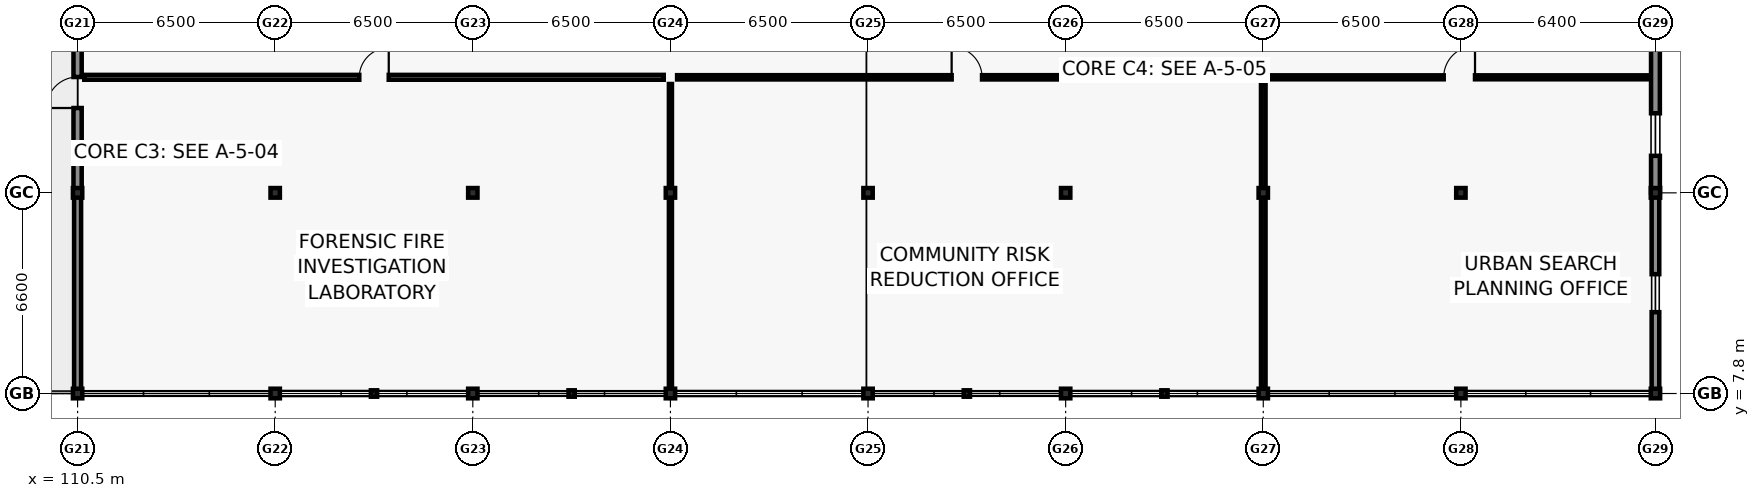
"""IFC4 building model, lengths in metres.
Left out: names, types, materials, properties, quantities, classifications, styles, units other than length and angle.
Written with IfcOpenShell. Run it as: python <this file> out.ifc"""

import sys

from ifc_helpers import new_model, si_unit, direction, frame, frame_2d, origin, origin_2d, place, context, subcontext, project, spatial, rectangle, i_section, extrude, element, fill, save


model = new_model("IFC4")
c1 = context("Model", 3, precision=1e-05, world=origin(), true_north=direction((0.0, 1.0)))
c2 = subcontext(c1, "Body", "Model", "MODEL_VIEW")
j1 = project(units=[si_unit("LENGTHUNIT", "METRE"), si_unit("PLANEANGLEUNIT", "RADIAN")], contexts=[c1])
p1 = place(None, origin())
s1 = spatial("IfcSite", under=j1, at=p1, CompositionType="ELEMENT")
p2 = place(p1, origin())
s2 = spatial("IfcBuilding", under=s1, at=p2, CompositionType="ELEMENT")
p3 = place(p2, frame((0.0, 0.0, 13.5)))
s3 = spatial("IfcBuildingStorey", under=s2, at=p3, CompositionType="ELEMENT", Elevation=13.5)
for number, where, z_axis, x_axis in (
    (1, (110.5, 7.8, 0.0), (0.0, 0.0, 1.0), (1.0, 0.0, 0.0)),
    (2, (110.5, 14.4, 0.0), (0.0, 0.0, 1.0), (1.0, 0.0, 0.0)),
    (3, (117.0, 7.8, 0.0), (0.0, 0.0, 1.0), (1.0, 0.0, 0.0)),
    (4, (117.0, 14.4, 0.0), (0.0, 0.0, 1.0), (1.0, 0.0, 0.0)),
    (5, (123.5, 7.8, 0.0), (0.0, 0.0, 1.0), (1.0, 0.0, 0.0)),
    (6, (123.5, 14.4, 0.0), (0.0, 0.0, 1.0), (1.0, 0.0, 0.0)),
    (7, (130.0, 7.8, 0.0), (0.0, 0.0, 1.0), (1.0, 0.0, 0.0)),
    (8, (130.0, 14.4, 0.0), (0.0, 0.0, 1.0), (1.0, 0.0, 0.0)),
    (9, (136.5, 7.8, 0.0), (0.0, 0.0, 1.0), (1.0, 0.0, 0.0)),
    (10, (136.5, 14.4, 0.0), (0.0, 0.0, 1.0), (1.0, 0.0, 0.0)),
    (11, (143.0, 7.8, 0.0), (0.0, 0.0, 1.0), (1.0, 0.0, 0.0)),
    (12, (143.0, 14.4, 0.0), (0.0, 0.0, 1.0), (1.0, 0.0, 0.0)),
    (13, (149.5, 7.8, 0.0), (0.0, 0.0, 1.0), (1.0, 0.0, 0.0)),
    (14, (149.5, 14.4, 0.0), (0.0, 0.0, 1.0), (1.0, 0.0, 0.0)),
    (15, (156.0, 7.8, 0.0), (0.0, 0.0, 1.0), (1.0, 0.0, 0.0)),
    (16, (156.0, 14.4, 0.0), (0.0, 0.0, 1.0), (1.0, 0.0, 0.0)),
    (17, (162.4, 7.8, 0.0), (0.0, 0.0, 1.0), (1.0, 0.0, 0.0)),
    (18, (162.4, 14.4, 0.0), (0.0, 0.0, 1.0), (1.0, 0.0, 0.0)),
):
    element("IfcColumn", number, at=place(p3, frame(where, z_axis=z_axis, x_axis=x_axis)), inside=s3, PredefinedType="COLUMN", context=c2, shape_type="SweptSolid", body=[
        extrude(i_section(OverallWidth=0.307, OverallDepth=0.315, WebThickness=0.012, FlangeThickness=0.019, FilletRadius=0.017, at=origin_2d()), origin(), (0.0, 0.0, 1.0), 3.9),
    ])
for number, where, z_axis, x_axis in (
    (19, (120.25, 7.8, 0.0), (0.0, 0.0, 1.0), (1.0, 0.0, 0.0)),
    (20, (126.75, 7.8, 0.0), (0.0, 0.0, 1.0), (1.0, 0.0, 0.0)),
    (21, (139.75, 7.8, 0.0), (0.0, 0.0, 1.0), (1.0, 0.0, 0.0)),
    (22, (146.25, 7.8, 0.0), (0.0, 0.0, 1.0), (1.0, 0.0, 0.0)),
):
    element("IfcColumn", number, at=place(p3, frame(where, z_axis=z_axis, x_axis=x_axis)), inside=s3, PredefinedType="PILASTER", context=c2, shape_type="SweptSolid", body=[
        extrude(i_section(OverallWidth=0.205, OverallDepth=0.21, WebThickness=0.009, FlangeThickness=0.014, FilletRadius=0.011, at=origin_2d()), origin(), (0.0, 0.0, 1.0), 3.9),
    ])
p4 = place(p3, frame((110.5, 7.805, 0.0), z_axis=(0.0, 0.0, 1.0), x_axis=(0.0, 1.0, 0.0)))
e23 = element("IfcWall", 23, at=p4, inside=s3, PredefinedType="SOLIDWALL", context=c2, shape_type="SweptSolid", body=[
    extrude(rectangle(XDim=6.59, YDim=0.23, at=frame_2d((3.295, 0.0))), origin(), (0.0, 0.0, 1.0), 3.02),
])
p5 = place(p3, frame((162.4, 14.395, 0.0), z_axis=(0.0, 0.0, 1.0), x_axis=(0.0, -1.0, 0.0)))
e24 = element("IfcWall", 24, at=p5, inside=s3, PredefinedType="SOLIDWALL", context=c2, shape_type="SweptSolid", body=[
    extrude(rectangle(XDim=6.59, YDim=0.25, at=frame_2d((3.295, 0.0))), origin(), (0.0, 0.0, 1.0), 3.02),
])
p6 = place(p5, frame((2.67, 0.0, 0.8)))
e25 = element("IfcOpeningElement", 25, at=p6, cuts=e24, PredefinedType="OPENING", context=c2, shape_type="SweptSolid", body=[
    extrude(rectangle(XDim=1.25, YDim=1.65, at=frame_2d((0.625, 0.825))), frame((0.0, 0.135, 0.0), z_axis=(0.0, -1.0, 0.0), x_axis=(1.0, 0.0, 0.0)), (0.0, 0.0, 1.0), 0.27),
])
p7 = place(p3, frame((110.5, 14.405, 0.0), z_axis=(0.0, 0.0, 1.0), x_axis=(0.0, 1.0, 0.0)))
e26 = element("IfcWall", 26, at=p7, inside=s3, PredefinedType="SOLIDWALL", context=c2, shape_type="SweptSolid", body=[
    extrude(rectangle(XDim=6.59, YDim=0.27, at=frame_2d((3.295, 0.0))), origin(), (0.0, 0.0, 1.0), 3.02),
])
p8 = place(p7, frame((2.785, 0.0, 0.0)))
e27 = element("IfcOpeningElement", 27, at=p8, cuts=e26, PredefinedType="OPENING", context=c2, shape_type="SweptSolid", body=[
    extrude(rectangle(XDim=1.02, YDim=2.14, at=frame_2d((0.51, 1.07))), frame((0.0, 0.145, 0.0), z_axis=(0.0, -1.0, 0.0), x_axis=(1.0, 0.0, 0.0)), (0.0, 0.0, 1.0), 0.29),
])
p9 = place(p3, frame((162.4, 20.995, 0.0), z_axis=(0.0, 0.0, 1.0), x_axis=(0.0, -1.0, 0.0)))
e28 = element("IfcWall", 28, at=p9, inside=s3, PredefinedType="SOLIDWALL", context=c2, shape_type="SweptSolid", body=[
    extrude(rectangle(XDim=6.59, YDim=0.29, at=frame_2d((3.295, 0.0))), origin(), (0.0, 0.0, 1.0), 3.02),
])
p10 = place(p9, frame((3.978, 0.0, 0.8)))
e29 = element("IfcOpeningElement", 29, at=p10, cuts=e28, PredefinedType="OPENING", context=c2, shape_type="SweptSolid", body=[
    extrude(rectangle(XDim=1.4, YDim=1.65, at=frame_2d((0.7, 0.825))), frame((0.0, 0.155, 0.0), z_axis=(0.0, -1.0, 0.0), x_axis=(1.0, 0.0, 0.0)), (0.0, 0.0, 1.0), 0.31),
])
p11 = place(p3, frame((130.0, 8.02, 0.0), z_axis=(0.0, 0.0, 1.0), x_axis=(0.0, 1.0, 0.0)))
e30 = element("IfcWall", 30, at=p11, inside=s3, PredefinedType="PARTITIONING", context=c2, shape_type="SweptSolid", body=[
    extrude(rectangle(XDim=9.96, YDim=0.1, at=frame_2d((4.98, 0.0))), origin(), (0.0, 0.0, 1.0), 3.0),
])
p12 = place(p3, frame((110.72, 18.2, 0.0), z_axis=(0.0, 0.0, 1.0), x_axis=(1.0, 0.0, 0.0)))
e31 = element("IfcWall", 31, at=p12, inside=s3, PredefinedType="PARTITIONING", context=c2, shape_type="SweptSolid", body=[
    extrude(rectangle(XDim=19.06, YDim=0.16, at=frame_2d((9.53, 0.0))), origin(), (0.0, 0.0, 1.0), 3.0),
])
p13 = place(p12, frame((9.045, 0.0, 0.0)))
e32 = element("IfcOpeningElement", 32, at=p13, cuts=e31, PredefinedType="OPENING", context=c2, shape_type="SweptSolid", body=[
    extrude(rectangle(XDim=0.97, YDim=2.1, at=frame_2d((0.485, 1.05))), frame((0.0, 0.09, 0.0), z_axis=(0.0, -1.0, 0.0), x_axis=(1.0, 0.0, 0.0)), (0.0, 0.0, 1.0), 0.18),
])
p14 = place(p3, frame((149.5, 8.02, 0.0), z_axis=(0.0, 0.0, 1.0), x_axis=(0.0, 1.0, 0.0)))
e33 = element("IfcWall", 33, at=p14, inside=s3, PredefinedType="PARTITIONING", context=c2, shape_type="SweptSolid", body=[
    extrude(rectangle(XDim=9.96, YDim=0.15, at=frame_2d((4.98, 0.0))), origin(), (0.0, 0.0, 1.0), 3.0),
])
p15 = place(p3, frame((130.22, 18.2, 0.0), z_axis=(0.0, 0.0, 1.0), x_axis=(1.0, 0.0, 0.0)))
e34 = element("IfcWall", 34, at=p15, inside=s3, PredefinedType="PARTITIONING", context=c2, shape_type="SweptSolid", body=[
    extrude(rectangle(XDim=19.06, YDim=0.14, at=frame_2d((9.53, 0.0))), origin(), (0.0, 0.0, 1.0), 3.0),
])
p16 = place(p15, frame((9.03, 0.0, 0.0)))
e35 = element("IfcOpeningElement", 35, at=p16, cuts=e34, PredefinedType="OPENING", context=c2, shape_type="SweptSolid", body=[
    extrude(rectangle(XDim=1.0, YDim=2.12, at=frame_2d((0.5, 1.06))), frame((0.0, 0.08, 0.0), z_axis=(0.0, -1.0, 0.0), x_axis=(1.0, 0.0, 0.0)), (0.0, 0.0, 1.0), 0.16),
])
p17 = place(p3, frame((149.72, 18.2, 0.0), z_axis=(0.0, 0.0, 1.0), x_axis=(1.0, 0.0, 0.0)))
e36 = element("IfcWall", 36, at=p17, inside=s3, PredefinedType="PARTITIONING", context=c2, shape_type="SweptSolid", body=[
    extrude(rectangle(XDim=12.46, YDim=0.13, at=frame_2d((6.23, 0.0))), origin(), (0.0, 0.0, 1.0), 3.0),
])
p18 = place(p17, frame((5.715, 0.0, 0.0)))
e37 = element("IfcOpeningElement", 37, at=p18, cuts=e36, PredefinedType="OPENING", context=c2, shape_type="SweptSolid", body=[
    extrude(rectangle(XDim=1.03, YDim=2.06, at=frame_2d((0.515, 1.03))), frame((0.0, 0.075, 0.0), z_axis=(0.0, -1.0, 0.0), x_axis=(1.0, 0.0, 0.0)), (0.0, 0.0, 1.0), 0.15),
])
p19 = place(p6, origin())
e38 = element("IfcWindow", 38, at=p19, inside=s3, PartitioningType="SINGLE_PANEL", PredefinedType="WINDOW", context=c2, shape_type="SweptSolid", body=[
    extrude(rectangle(XDim=1.25, YDim=1.65, at=frame_2d((0.625, 0.825))), frame((0.0, 0.03, 0.0), z_axis=(0.0, -1.0, 0.0), x_axis=(1.0, 0.0, 0.0)), (0.0, 0.0, 1.0), 0.06),
])
fill(e25, e38)
p20 = place(p8, origin())
e39 = element("IfcDoor", 39, at=p20, inside=s3, OperationType="SINGLE_SWING_LEFT", PredefinedType="DOOR", context=c2, shape_type="SweptSolid", body=[
    extrude(rectangle(XDim=1.02, YDim=2.14, at=frame_2d((0.51, 1.07))), frame((0.0, 0.025, 0.0), z_axis=(0.0, -1.0, 0.0), x_axis=(1.0, 0.0, 0.0)), (0.0, 0.0, 1.0), 0.05),
])
fill(e27, e39)
p21 = place(p10, origin())
e40 = element("IfcWindow", 40, at=p21, inside=s3, PartitioningType="SINGLE_PANEL", PredefinedType="WINDOW", context=c2, shape_type="SweptSolid", body=[
    extrude(rectangle(XDim=1.4, YDim=1.65, at=frame_2d((0.7, 0.825))), frame((0.0, 0.03, 0.0), z_axis=(0.0, -1.0, 0.0), x_axis=(1.0, 0.0, 0.0)), (0.0, 0.0, 1.0), 0.06),
])
fill(e29, e40)
p22 = place(p13, origin())
e41 = element("IfcDoor", 41, at=p22, inside=s3, OperationType="SINGLE_SWING_RIGHT", PredefinedType="DOOR", context=c2, shape_type="SweptSolid", body=[
    extrude(rectangle(XDim=0.97, YDim=2.1, at=frame_2d((0.485, 1.05))), frame((0.0, 0.025, 0.0), z_axis=(0.0, -1.0, 0.0), x_axis=(1.0, 0.0, 0.0)), (0.0, 0.0, 1.0), 0.05),
])
fill(e32, e41)
p23 = place(p16, origin())
e42 = element("IfcDoor", 42, at=p23, inside=s3, OperationType="SINGLE_SWING_LEFT", PredefinedType="DOOR", context=c2, shape_type="SweptSolid", body=[
    extrude(rectangle(XDim=1.0, YDim=2.12, at=frame_2d((0.5, 1.06))), frame((0.0, 0.025, 0.0), z_axis=(0.0, -1.0, 0.0), x_axis=(1.0, 0.0, 0.0)), (0.0, 0.0, 1.0), 0.05),
])
fill(e35, e42)
p24 = place(p18, origin())
e43 = element("IfcDoor", 43, at=p24, inside=s3, OperationType="SINGLE_SWING_RIGHT", PredefinedType="DOOR", context=c2, shape_type="SweptSolid", body=[
    extrude(rectangle(XDim=1.03, YDim=2.06, at=frame_2d((0.515, 1.03))), frame((0.0, 0.025, 0.0), z_axis=(0.0, -1.0, 0.0), x_axis=(1.0, 0.0, 0.0)), (0.0, 0.0, 1.0), 0.05),
])
fill(e37, e43)
save(model, sys.argv[1])
